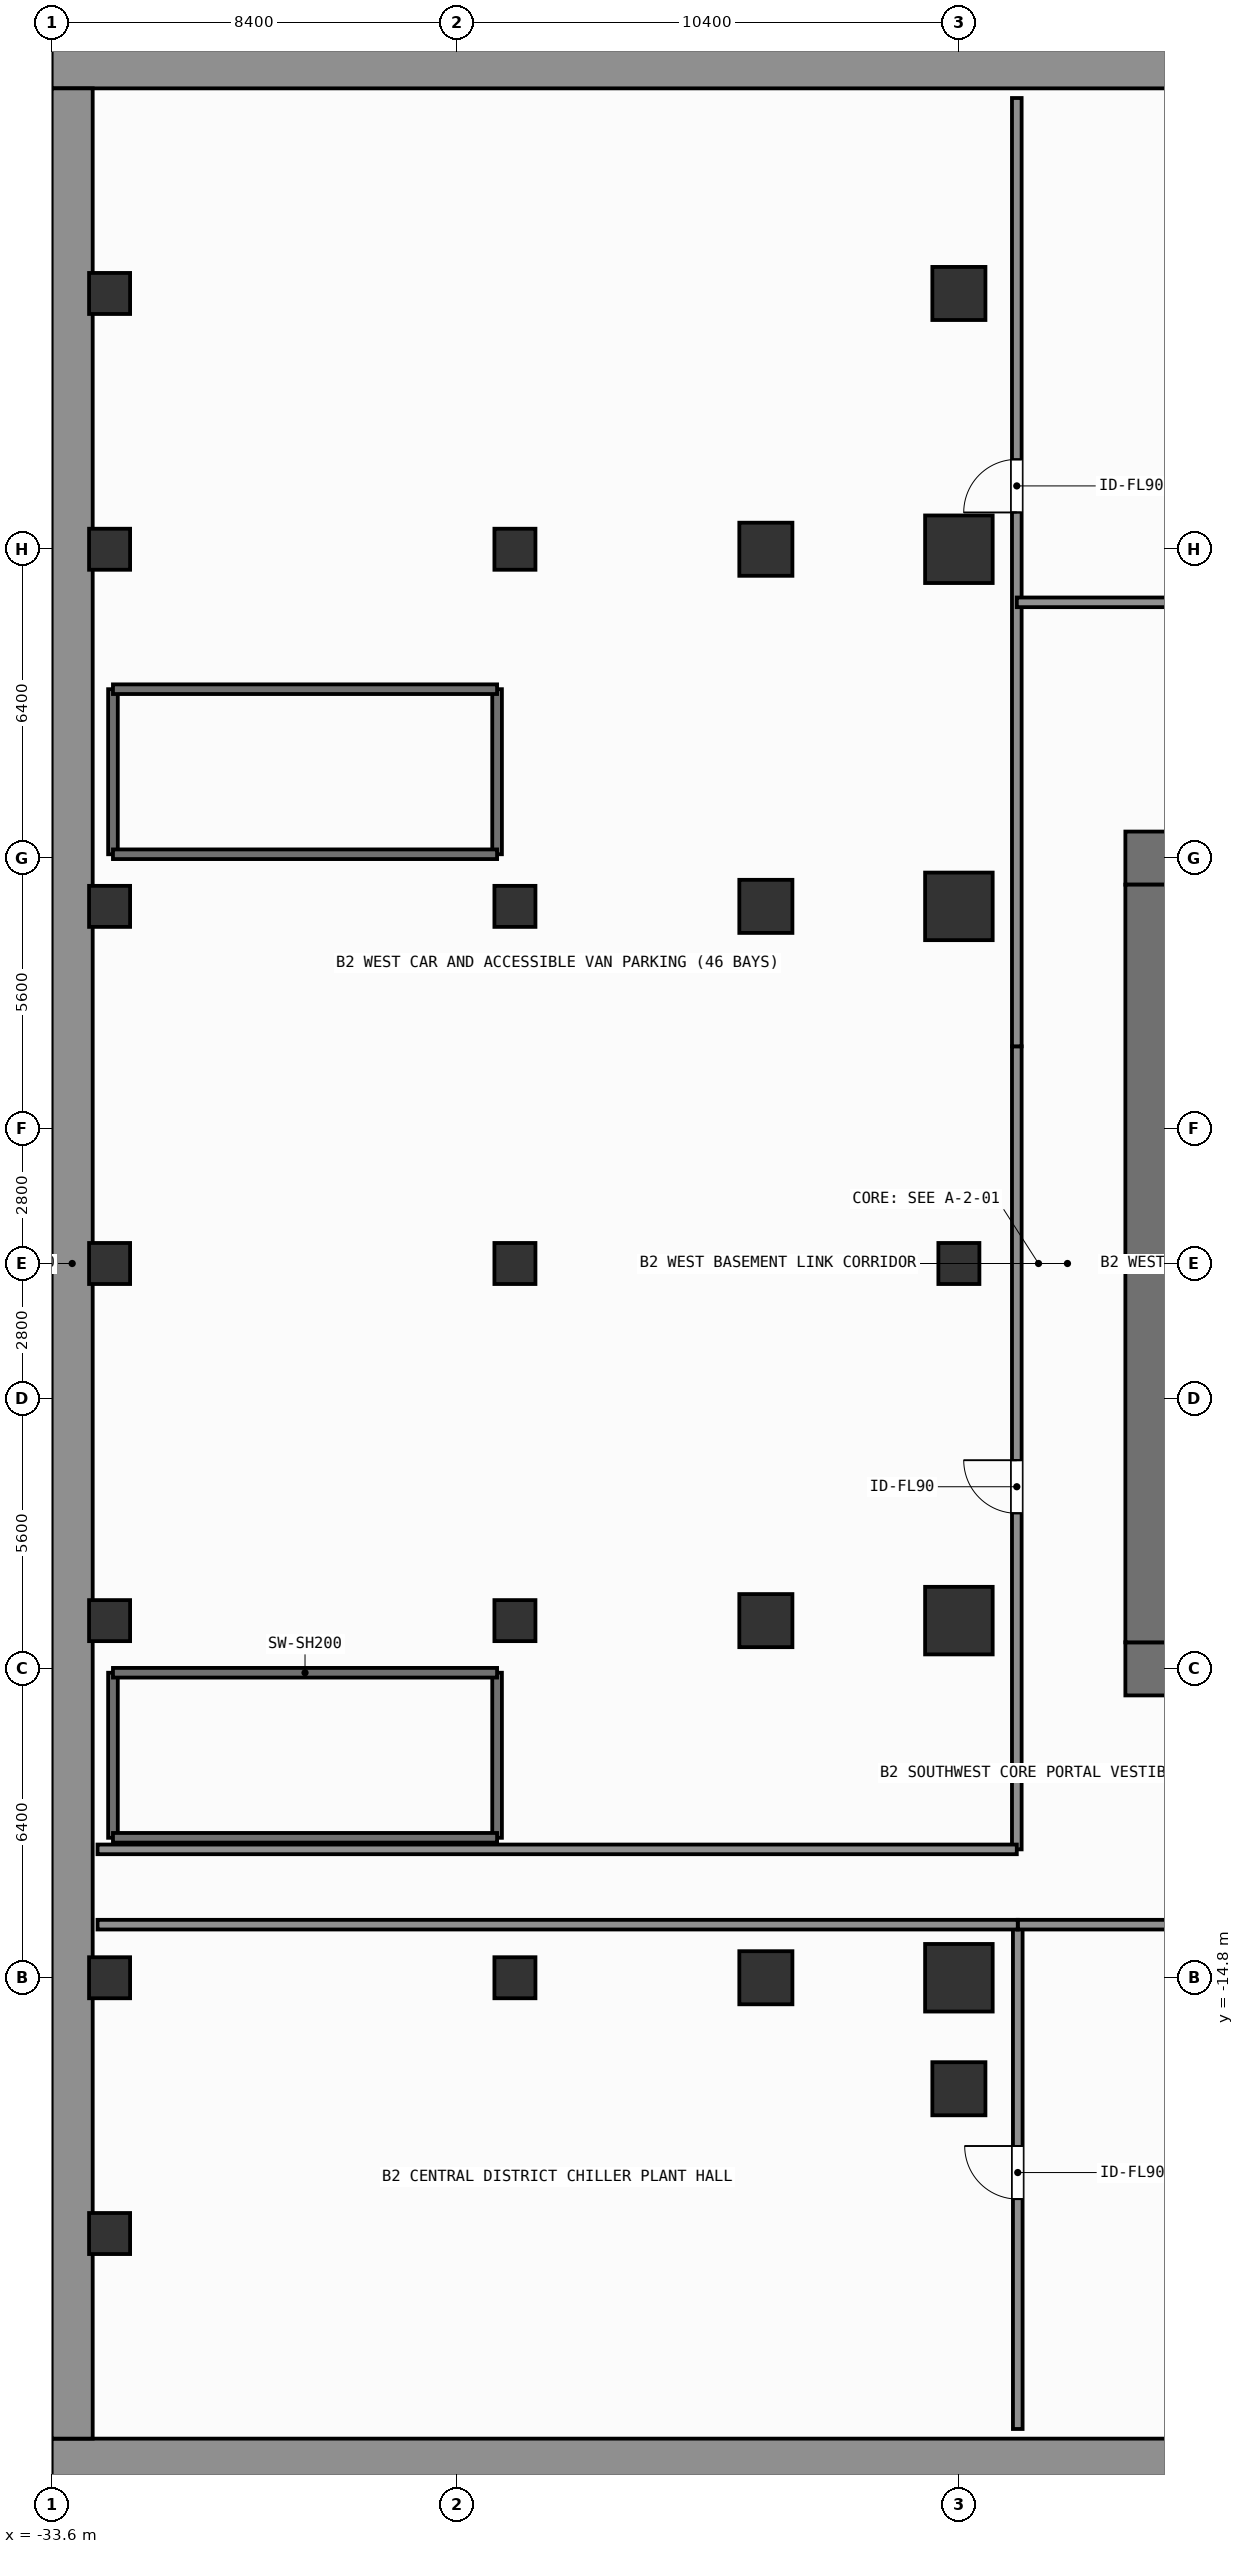
"""IFC4 building model, lengths in metres.
Left out: names, types, materials, properties, quantities, classifications, styles, units other than length and angle.
Written with IfcOpenShell. Run it as: python <this file> out.ifc"""

import sys

from ifc_helpers import new_model, si_unit, direction, frame, frame_2d, origin, origin_2d, place, context, subcontext, project, spatial, rectangle, extrude, element, fill, save


model = new_model("IFC4")
c1 = context("Model", 3, precision=1e-05, world=origin(), true_north=direction((0.0, 1.0)))
c2 = subcontext(c1, "Body", "Model", "MODEL_VIEW")
j1 = project(units=[si_unit("LENGTHUNIT", "METRE"), si_unit("PLANEANGLEUNIT", "RADIAN")], contexts=[c1])
p1 = place(None, origin())
s1 = spatial("IfcSite", under=j1, at=p1, CompositionType="ELEMENT")
p2 = place(p1, origin())
s2 = spatial("IfcBuilding", under=s1, at=p2, CompositionType="ELEMENT")
p3 = place(p2, frame((0.0, 0.0, -8.4)))
s3 = spatial("IfcBuildingStorey", under=s2, at=p3, CompositionType="ELEMENT", Elevation=-8.4)
for number, where, z_axis, x_axis in (
    (1, (-33.6, -24.775, 0.0), (0.0, 0.0, 1.0), (1.0, 0.0, 0.0)),
    (2, (-33.6, 24.775, 0.0), (0.0, 0.0, 1.0), (1.0, 0.0, 0.0)),
):
    element("IfcWall", number, at=place(p3, frame(where, z_axis=z_axis, x_axis=x_axis)), inside=s3, PredefinedType="SOLIDWALL", context=c2, shape_type="SweptSolid", body=[
        extrude(rectangle(XDim=67.2, YDim=0.85, at=frame_2d((33.6, 0.0))), origin(), (0.0, 0.0, 1.0), 4.2),
    ])
p4 = place(p3, frame((-33.175, -24.35, 0.0), z_axis=(0.0, 0.0, 1.0), x_axis=(0.0, 1.0, 0.0)))
e3 = element("IfcWall", 3, at=p4, inside=s3, PredefinedType="SOLIDWALL", context=c2, shape_type="SweptSolid", body=[
    extrude(rectangle(XDim=48.7, YDim=0.85, at=frame_2d((24.35, 0.0))), origin(), (0.0, 0.0, 1.0), 4.2),
])
for number, where, z_axis, x_axis in (
    (4, (-11.35, -8.4, 0.0), (0.0, 0.0, 1.0), (1.0, 0.0, 0.0)),
    (5, (-11.35, 8.4, 0.0), (0.0, 0.0, 1.0), (1.0, 0.0, 0.0)),
):
    element("IfcWall", number, at=place(p3, frame(where, z_axis=z_axis, x_axis=x_axis)), inside=s3, PredefinedType="SHEAR", context=c2, shape_type="SweptSolid", body=[
        extrude(rectangle(XDim=1.65, YDim=1.1, at=frame_2d((0.825, 0.0))), origin(), (0.0, 0.0, 1.0), 4.2),
    ])
p5 = place(p3, frame((-10.8, -7.85, 0.0), z_axis=(0.0, 0.0, 1.0), x_axis=(0.0, 1.0, 0.0)))
e6 = element("IfcWall", 6, at=p5, inside=s3, PredefinedType="SHEAR", context=c2, shape_type="SweptSolid", body=[
    extrude(rectangle(XDim=15.7, YDim=1.1, at=frame_2d((7.85, 0.0))), origin(), (0.0, 0.0, 1.0), 4.2),
])
for number, where, z_axis, x_axis in (
    (7, (-14.8, -14.8, 0.0), (0.0, 0.0, 1.0), (1.0, 0.0, 0.0)),
    (8, (-14.8, 14.8, 0.0), (0.0, 0.0, 1.0), (1.0, 0.0, 0.0)),
    (9, (-14.8, -7.4, 0.0), (0.0, 0.0, 1.0), (1.0, 0.0, 0.0)),
    (10, (-14.8, 7.4, 0.0), (0.0, 0.0, 1.0), (1.0, 0.0, 0.0)),
):
    element("IfcColumn", number, at=place(p3, frame(where, z_axis=z_axis, x_axis=x_axis)), inside=s3, PredefinedType="COLUMN", context=c2, shape_type="SweptSolid", body=[
        extrude(rectangle(XDim=1.4, YDim=1.4, at=origin_2d()), origin(), (0.0, 0.0, 1.0), 4.2),
    ])
for number, where, z_axis, x_axis in (
    (11, (-18.8, -14.8, 0.0), (0.0, 0.0, 1.0), (1.0, 0.0, 0.0)),
    (12, (-18.8, -7.4, 0.0), (0.0, 0.0, 1.0), (1.0, 0.0, 0.0)),
    (13, (-18.8, 7.4, 0.0), (0.0, 0.0, 1.0), (1.0, 0.0, 0.0)),
    (14, (-18.8, 14.8, 0.0), (0.0, 0.0, 1.0), (1.0, 0.0, 0.0)),
    (15, (-14.8, -17.1, 0.0), (0.0, 0.0, 1.0), (1.0, 0.0, 0.0)),
    (16, (-14.8, 20.1, 0.0), (0.0, 0.0, 1.0), (1.0, 0.0, 0.0)),
):
    element("IfcColumn", number, at=place(p3, frame(where, z_axis=z_axis, x_axis=x_axis)), inside=s3, PredefinedType="COLUMN", context=c2, shape_type="SweptSolid", body=[
        extrude(rectangle(XDim=1.1, YDim=1.1, at=origin_2d()), origin(), (0.0, 0.0, 1.0), 4.2),
    ])
for number, where, z_axis, x_axis in (
    (17, (-32.4, -14.8, 0.0), (0.0, 0.0, 1.0), (1.0, 0.0, 0.0)),
    (18, (-32.4, -7.4, 0.0), (0.0, 0.0, 1.0), (1.0, 0.0, 0.0)),
    (19, (-32.4, 0.0, 0.0), (0.0, 0.0, 1.0), (1.0, 0.0, 0.0)),
    (20, (-32.4, 7.4, 0.0), (0.0, 0.0, 1.0), (1.0, 0.0, 0.0)),
    (21, (-32.4, 14.8, 0.0), (0.0, 0.0, 1.0), (1.0, 0.0, 0.0)),
    (22, (-24.0, -14.8, 0.0), (0.0, 0.0, 1.0), (1.0, 0.0, 0.0)),
    (23, (-24.0, -7.4, 0.0), (0.0, 0.0, 1.0), (1.0, 0.0, 0.0)),
    (24, (-24.0, 0.0, 0.0), (0.0, 0.0, 1.0), (1.0, 0.0, 0.0)),
    (25, (-24.0, 7.4, 0.0), (0.0, 0.0, 1.0), (1.0, 0.0, 0.0)),
    (26, (-24.0, 14.8, 0.0), (0.0, 0.0, 1.0), (1.0, 0.0, 0.0)),
    (27, (-14.8, 0.0, 0.0), (0.0, 0.0, 1.0), (1.0, 0.0, 0.0)),
    (28, (-32.4, -20.1, 0.0), (0.0, 0.0, 1.0), (1.0, 0.0, 0.0)),
    (29, (-32.4, 20.1, 0.0), (0.0, 0.0, 1.0), (1.0, 0.0, 0.0)),
):
    element("IfcColumn", number, at=place(p3, frame(where, z_axis=z_axis, x_axis=x_axis)), inside=s3, PredefinedType="COLUMN", context=c2, shape_type="SweptSolid", body=[
        extrude(rectangle(XDim=0.85, YDim=0.85, at=origin_2d()), origin(), (0.0, 0.0, 1.0), 4.2),
    ])
for number, where, z_axis, x_axis in (
    (30, (-32.33, -11.9, 0.0), (0.0, 0.0, 1.0), (0.0, 1.0, 0.0)),
    (31, (-24.37, -8.48, 0.0), (0.0, 0.0, 1.0), (0.0, -1.0, 0.0)),
):
    element("IfcWall", number, at=place(p3, frame(where, z_axis=z_axis, x_axis=x_axis)), inside=s3, PredefinedType="SHEAR", context=c2, shape_type="SweptSolid", body=[
        extrude(rectangle(XDim=3.42, YDim=0.2, at=frame_2d((1.71, 0.0))), origin(), (0.0, 0.0, 1.0), 3.94),
    ])
for number, where, z_axis, x_axis in (
    (32, (-24.37, -11.9, 0.0), (0.0, 0.0, 1.0), (-1.0, 0.0, 0.0)),
    (33, (-32.33, -8.48, 0.0), (0.0, 0.0, 1.0), (1.0, 0.0, 0.0)),
):
    element("IfcWall", number, at=place(p3, frame(where, z_axis=z_axis, x_axis=x_axis)), inside=s3, PredefinedType="SHEAR", context=c2, shape_type="SweptSolid", body=[
        extrude(rectangle(XDim=7.96, YDim=0.2, at=frame_2d((3.98, 0.0))), origin(), (0.0, 0.0, 1.0), 3.94),
    ])
for number, where, z_axis, x_axis in (
    (34, (-32.33, 8.48, 0.0), (0.0, 0.0, 1.0), (0.0, 1.0, 0.0)),
    (35, (-24.37, 11.9, 0.0), (0.0, 0.0, 1.0), (0.0, -1.0, 0.0)),
):
    element("IfcWall", number, at=place(p3, frame(where, z_axis=z_axis, x_axis=x_axis)), inside=s3, PredefinedType="SHEAR", context=c2, shape_type="SweptSolid", body=[
        extrude(rectangle(XDim=3.42, YDim=0.2, at=frame_2d((1.71, 0.0))), origin(), (0.0, 0.0, 1.0), 3.94),
    ])
for number, where, z_axis, x_axis in (
    (36, (-24.37, 8.48, 0.0), (0.0, 0.0, 1.0), (-1.0, 0.0, 0.0)),
    (37, (-32.33, 11.9, 0.0), (0.0, 0.0, 1.0), (1.0, 0.0, 0.0)),
):
    element("IfcWall", number, at=place(p3, frame(where, z_axis=z_axis, x_axis=x_axis)), inside=s3, PredefinedType="SHEAR", context=c2, shape_type="SweptSolid", body=[
        extrude(rectangle(XDim=7.96, YDim=0.2, at=frame_2d((3.98, 0.0))), origin(), (0.0, 0.0, 1.0), 3.94),
    ])
p6 = place(p3, frame((-13.6, -12.14, 0.0), z_axis=(0.0, 0.0, 1.0), x_axis=(0.0, 1.0, 0.0)))
e38 = element("IfcWall", 38, at=p6, inside=s3, PredefinedType="SOLIDWALL", context=c2, shape_type="SweptSolid", body=[
    extrude(rectangle(XDim=16.64, YDim=0.2, at=frame_2d((8.32, 0.0))), origin(), (0.0, 0.0, 1.0), 3.94),
])
p7 = place(p6, frame((6.964, 0.0, 0.0)))
e39 = element("IfcOpeningElement", 39, at=p7, cuts=e38, PredefinedType="OPENING", context=c2, shape_type="SweptSolid", body=[
    extrude(rectangle(XDim=1.1, YDim=2.15, at=frame_2d((0.55, 1.075))), frame((0.0, 0.11, 0.0), z_axis=(0.0, -1.0, 0.0), x_axis=(1.0, 0.0, 0.0)), (0.0, 0.0, 1.0), 0.22),
])
p8 = place(p3, frame((-13.6, 4.5, 0.0), z_axis=(0.0, 0.0, 1.0), x_axis=(0.0, 1.0, 0.0)))
e40 = element("IfcWall", 40, at=p8, inside=s3, PredefinedType="SOLIDWALL", context=c2, shape_type="SweptSolid", body=[
    extrude(rectangle(XDim=19.65, YDim=0.2, at=frame_2d((9.825, 0.0))), origin(), (0.0, 0.0, 1.0), 3.94),
])
p9 = place(p8, frame((11.062, 0.0, 0.0)))
e41 = element("IfcOpeningElement", 41, at=p9, cuts=e40, PredefinedType="OPENING", context=c2, shape_type="SweptSolid", body=[
    extrude(rectangle(XDim=1.1, YDim=2.15, at=frame_2d((0.55, 1.075))), frame((0.0, 0.11, 0.0), z_axis=(0.0, -1.0, 0.0), x_axis=(1.0, 0.0, 0.0)), (0.0, 0.0, 1.0), 0.22),
])
p10 = place(p3, frame((-13.6, 13.7, 0.0), z_axis=(0.0, 0.0, 1.0), x_axis=(1.0, 0.0, 0.0)))
e42 = element("IfcWall", 42, at=p10, inside=s3, PredefinedType="SOLIDWALL", context=c2, shape_type="SweptSolid", body=[
    extrude(rectangle(XDim=31.3, YDim=0.2, at=frame_2d((15.65, 0.0))), origin(), (0.0, 0.0, 1.0), 3.94),
])
p11 = place(p10, frame((14.38, 0.0, 0.0)))
e43 = element("IfcOpeningElement", 43, at=p11, cuts=e42, PredefinedType="OPENING", context=c2, shape_type="SweptSolid", body=[
    extrude(rectangle(XDim=1.1, YDim=2.15, at=frame_2d((0.55, 1.075))), frame((0.0, 0.11, 0.0), z_axis=(0.0, -1.0, 0.0), x_axis=(1.0, 0.0, 0.0)), (0.0, 0.0, 1.0), 0.22),
])
p12 = place(p3, frame((-13.58, -24.15, 0.0), z_axis=(0.0, 0.0, 1.0), x_axis=(0.0, 1.0, 0.0)))
e44 = element("IfcWall", 44, at=p12, inside=s3, PredefinedType="SOLIDWALL", context=c2, shape_type="SweptSolid", body=[
    extrude(rectangle(XDim=10.45, YDim=0.2, at=frame_2d((5.225, 0.0))), origin(), (0.0, 0.0, 1.0), 3.94),
])
p13 = place(p12, frame((4.763, 0.0, 0.0)))
e45 = element("IfcOpeningElement", 45, at=p13, cuts=e44, PredefinedType="OPENING", context=c2, shape_type="SweptSolid", body=[
    extrude(rectangle(XDim=1.1, YDim=2.15, at=frame_2d((0.55, 1.075))), frame((0.0, 0.11, 0.0), z_axis=(0.0, -1.0, 0.0), x_axis=(1.0, 0.0, 0.0)), (0.0, 0.0, 1.0), 0.22),
])
p14 = place(p3, frame((-13.58, -13.7, 0.0), z_axis=(0.0, 0.0, 1.0), x_axis=(1.0, 0.0, 0.0)))
e46 = element("IfcWall", 46, at=p14, inside=s3, PredefinedType="SOLIDWALL", context=c2, shape_type="SweptSolid", body=[
    extrude(rectangle(XDim=20.23, YDim=0.2, at=frame_2d((10.115, 0.0))), origin(), (0.0, 0.0, 1.0), 3.94),
])
p15 = place(p14, frame((8.58, 0.0, 0.0)))
e47 = element("IfcOpeningElement", 47, at=p15, cuts=e46, PredefinedType="OPENING", context=c2, shape_type="SweptSolid", body=[
    extrude(rectangle(XDim=1.1, YDim=2.15, at=frame_2d((0.55, 1.075))), frame((0.0, 0.11, 0.0), z_axis=(0.0, -1.0, 0.0), x_axis=(1.0, 0.0, 0.0)), (0.0, 0.0, 1.0), 0.22),
])
p16 = place(p3, frame((-32.65, -12.14, 0.0), z_axis=(0.0, 0.0, 1.0), x_axis=(1.0, 0.0, 0.0)))
e48 = element("IfcWall", 48, at=p16, inside=s3, PredefinedType="SOLIDWALL", context=c2, shape_type="SweptSolid", body=[
    extrude(rectangle(XDim=19.05, YDim=0.2, at=frame_2d((9.525, 0.0))), origin(), (0.0, 0.0, 1.0), 3.94),
])
p17 = place(p3, frame((-32.65, -13.7, 0.0), z_axis=(0.0, 0.0, 1.0), x_axis=(1.0, 0.0, 0.0)))
e49 = element("IfcWall", 49, at=p17, inside=s3, PredefinedType="SOLIDWALL", context=c2, shape_type="SweptSolid", body=[
    extrude(rectangle(XDim=19.07, YDim=0.2, at=frame_2d((9.535, 0.0))), origin(), (0.0, 0.0, 1.0), 3.94),
])
p18 = place(p7, origin())
e50 = element("IfcDoor", 50, at=p18, inside=s3, OperationType="SINGLE_SWING_RIGHT", PredefinedType="DOOR", context=c2, shape_type="SweptSolid", body=[
    extrude(rectangle(XDim=1.1, YDim=2.15, at=frame_2d((0.55, 1.075))), frame((0.0, 0.025, 0.0), z_axis=(0.0, -1.0, 0.0), x_axis=(1.0, 0.0, 0.0)), (0.0, 0.0, 1.0), 0.05),
])
fill(e39, e50)
p19 = place(p9, origin())
e51 = element("IfcDoor", 51, at=p19, inside=s3, OperationType="SINGLE_SWING_LEFT", PredefinedType="DOOR", context=c2, shape_type="SweptSolid", body=[
    extrude(rectangle(XDim=1.1, YDim=2.15, at=frame_2d((0.55, 1.075))), frame((0.0, 0.025, 0.0), z_axis=(0.0, -1.0, 0.0), x_axis=(1.0, 0.0, 0.0)), (0.0, 0.0, 1.0), 0.05),
])
fill(e41, e51)
p20 = place(p13, origin())
e52 = element("IfcDoor", 52, at=p20, inside=s3, OperationType="SINGLE_SWING_RIGHT", PredefinedType="DOOR", context=c2, shape_type="SweptSolid", body=[
    extrude(rectangle(XDim=1.1, YDim=2.15, at=frame_2d((0.55, 1.075))), frame((0.0, 0.025, 0.0), z_axis=(0.0, -1.0, 0.0), x_axis=(1.0, 0.0, 0.0)), (0.0, 0.0, 1.0), 0.05),
])
fill(e45, e52)
save(model, sys.argv[1])
